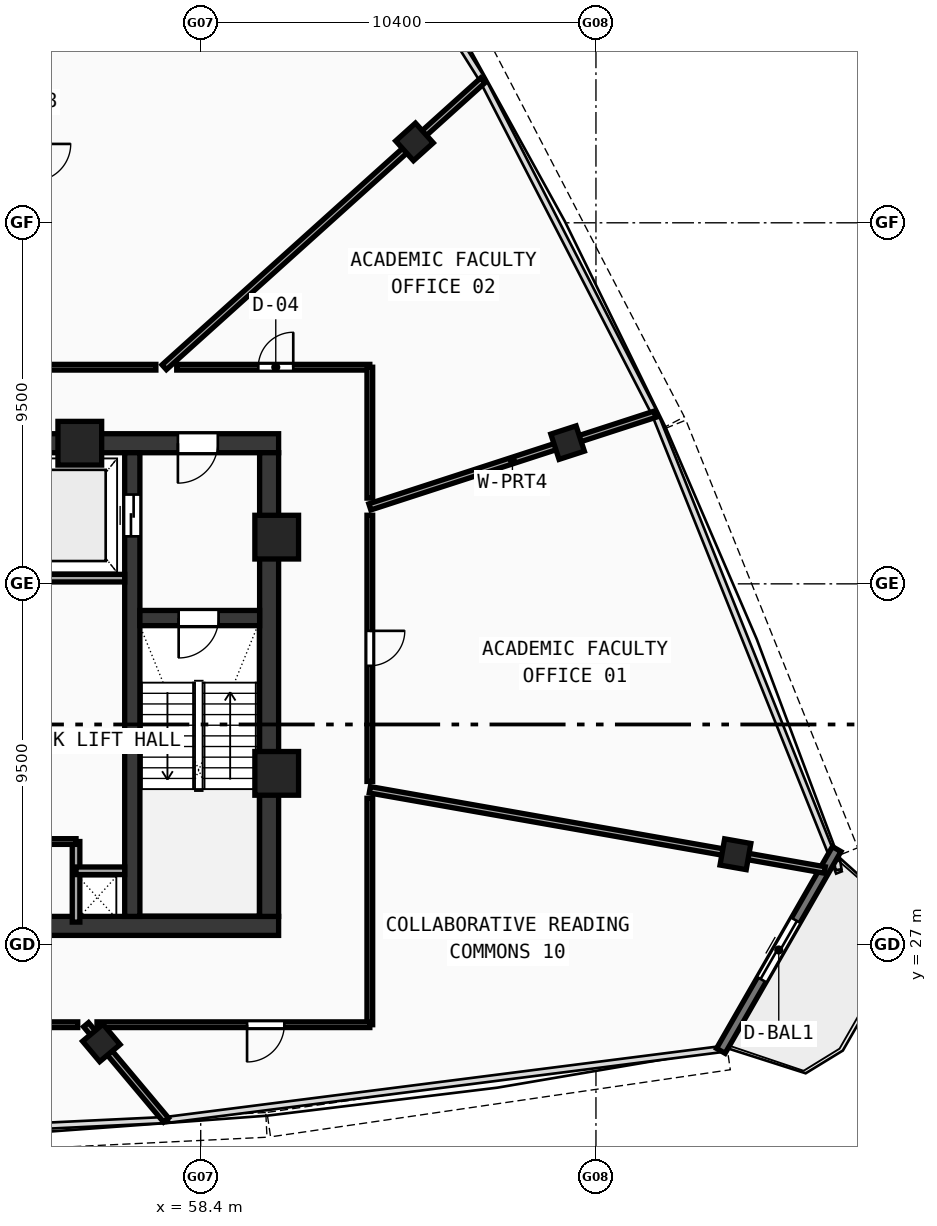
"""IFC4 building model, lengths in metres.
Left out: names, types, materials, properties, quantities, classifications, styles, units other than length and angle.
Written with IfcOpenShell. Run it as: python <this file> out.ifc"""

import sys

from ifc_helpers import new_model, si_unit, direction, frame, frame_2d, origin, origin_with_axes, origin_2d, place, context, subcontext, project, spatial, rectangle, hollow_rectangle, extrude, source, transform, mapped, element, fill, save


model = new_model("IFC4")
c1 = context("Model", 3, precision=1e-05, world=origin(), true_north=direction((0.0, 1.0)))
c2 = subcontext(c1, "Body", "Model", "MODEL_VIEW")
j1 = project(units=[si_unit("LENGTHUNIT", "METRE"), si_unit("PLANEANGLEUNIT", "RADIAN")], contexts=[c1])
p1 = place(None, origin())
s1 = spatial("IfcSite", under=j1, at=p1, CompositionType="ELEMENT")
p2 = place(p1, origin())
s2 = spatial("IfcBuilding", under=s1, at=p2, CompositionType="ELEMENT")
p3 = place(p2, frame((0.0, 0.0, 348.01)))
s3 = spatial("IfcBuildingStorey", under=s2, at=p3, CompositionType="ELEMENT", Elevation=348.01)
p4 = place(p3, frame((35.55, 27.5, 0.0), z_axis=(0.0, 0.0, 1.0), x_axis=(1.0, 0.0, 0.0)))
e1 = element("IfcWall", 1, at=p4, inside=s3, PredefinedType="SHEAR", context=c2, shape_type="SweptSolid", body=[
    extrude(rectangle(XDim=24.9, YDim=0.5, at=frame_2d((12.45, 0.0))), origin(), (0.0, 0.0, 1.0), 3.49),
])
p5 = place(p3, frame((49.2, 40.2, 0.0), z_axis=(0.0, 0.0, 1.0), x_axis=(1.0, 0.0, 0.0)))
e2 = element("IfcWall", 2, at=p5, inside=s3, PredefinedType="SHEAR", context=c2, shape_type="SweptSolid", body=[
    extrude(rectangle(XDim=11.25, YDim=0.5, at=frame_2d((5.625, 0.0))), origin(), (0.0, 0.0, 1.0), 3.49),
])
p6 = place(p5, frame((8.6, 0.0, 0.0)))
e3 = element("IfcOpeningElement", 3, at=p6, cuts=e2, PredefinedType="OPENING", context=c2, shape_type="SweptSolid", body=[
    extrude(rectangle(XDim=1.05, YDim=2.1, at=frame_2d((0.525, 1.05))), frame((0.0, 0.26, 0.0), z_axis=(0.0, -1.0, 0.0), x_axis=(1.0, 0.0, 0.0)), (0.0, 0.0, 1.0), 0.52),
])
p7 = place(p3, frame((60.2, 27.75, 0.0), z_axis=(0.0, 0.0, 1.0), x_axis=(0.0, 1.0, 0.0)))
e4 = element("IfcWall", 4, at=p7, inside=s3, PredefinedType="SHEAR", context=c2, shape_type="SweptSolid", body=[
    extrude(rectangle(XDim=12.2, YDim=0.5, at=frame_2d((6.1, 0.0))), origin(), (0.0, 0.0, 1.0), 3.49),
])
p8 = place(p3, frame((56.6, 27.75, 0.0), z_axis=(0.0, 0.0, 1.0), x_axis=(0.0, 1.0, 0.0)))
e5 = element("IfcWall", 5, at=p8, inside=s3, PredefinedType="SHEAR", context=c2, shape_type="SweptSolid", body=[
    extrude(rectangle(XDim=12.2, YDim=0.4, at=frame_2d((6.1, 0.0))), origin(), (0.0, 0.0, 1.0), 3.49),
])
p9 = place(p8, frame((10.0, 0.0, 0.0)))
e6 = element("IfcOpeningElement", 6, at=p9, cuts=e5, PredefinedType="OPENING", context=c2, shape_type="SweptSolid", body=[
    extrude(rectangle(XDim=1.1, YDim=2.1, at=frame_2d((0.55, 1.05))), frame((0.0, 0.21, 0.0), z_axis=(0.0, -1.0, 0.0), x_axis=(1.0, 0.0, 0.0)), (0.0, 0.0, 1.0), 0.42),
])
p10 = place(p3, frame((56.8, 35.6, 0.0), z_axis=(0.0, 0.0, 1.0), x_axis=(1.0, 0.0, 0.0)))
e7 = element("IfcWall", 7, at=p10, inside=s3, PredefinedType="SHEAR", context=c2, shape_type="SweptSolid", body=[
    extrude(rectangle(XDim=3.15, YDim=0.4, at=frame_2d((1.575, 0.0))), origin(), (0.0, 0.0, 1.0), 3.49),
])
p11 = place(p10, frame((1.02, 0.0, 0.0)))
e8 = element("IfcOpeningElement", 8, at=p11, cuts=e7, PredefinedType="OPENING", context=c2, shape_type="SweptSolid", body=[
    extrude(rectangle(XDim=1.05, YDim=2.1, at=frame_2d((0.525, 1.05))), frame((0.0, 0.21, 0.0), z_axis=(0.0, -1.0, 0.0), x_axis=(1.0, 0.0, 0.0)), (0.0, 0.0, 1.0), 0.42),
])
m1 = source(origin(), c2, "Body", "SweptSolid", [
    extrude(hollow_rectangle(XDim=1.15, YDim=1.15, WallThickness=0.048, at=origin_2d()), origin(), (0.0, 0.0, 1.0), 3.75),
])
for number, where, z_axis, x_axis in (
    (9, (60.4, 31.513, -0.26), (0.0, 0.0, 1.0), (1.0, 0.0, 0.0)),
    (10, (60.4, 37.729, -0.26), (0.0, 0.0, 1.0), (1.0, 0.0, 0.0)),
    (11, (55.219, 40.2, -0.26), (0.0, 0.0, 1.0), (1.0, 0.0, 0.0)),
):
    element("IfcColumn", number, at=place(p3, frame(where, z_axis=z_axis, x_axis=x_axis)), inside=s3, PredefinedType="COLUMN", context=c2, shape_type="MappedRepresentation", body=[
        mapped(m1, transform((0.0, 0.0, 0.0), scale=1.0)),
    ])
m2 = source(origin(), c2, "Body", "SweptSolid", [
    extrude(hollow_rectangle(XDim=0.7, YDim=0.7, WallThickness=0.026, at=origin_2d()), origin(), (0.0, 0.0, 1.0), 3.75),
])
for number, where, z_axis, x_axis in (
    (12, (55.785, 24.422, -0.26), (0.0, 0.0, 1.0), (0.766, 0.643, 0.0)),
    (13, (72.47, 29.385, -0.26), (0.0, 0.0, 1.0), (0.174, 0.985, 0.0)),
    (14, (68.053, 40.216, -0.26), (0.0, 0.0, 1.0), (-0.309, 0.951, 0.0)),
    (15, (64.025, 48.129, -0.26), (0.0, 0.0, 1.0), (-0.669, 0.743, 0.0)),
):
    element("IfcColumn", number, at=place(p3, frame(where, z_axis=z_axis, x_axis=x_axis)), inside=s3, PredefinedType="COLUMN", context=c2, shape_type="MappedRepresentation", body=[
        mapped(m2, transform((0.0, 0.0, 0.0), scale=1.0)),
    ])
p12 = place(p3, frame((72.086, 24.212, 0.0), z_axis=(0.0, 0.0, 1.0), x_axis=(0.49795859982, 0.867200803082, 0.0)))
e16 = element("IfcWall", 16, at=p12, inside=s3, PredefinedType="STANDARD", context=c2, shape_type="SweptSolid", body=[
    extrude(rectangle(XDim=6.123, YDim=0.26, at=frame_2d((3.061, 0.0))), origin(), (0.0, 0.0, 1.0), 3.49),
])
p13 = place(p12, frame((2.161, 0.0, 0.0)))
e17 = element("IfcOpeningElement", 17, at=p13, cuts=e16, PredefinedType="OPENING", context=c2, shape_type="SweptSolid", body=[
    extrude(rectangle(XDim=1.8, YDim=2.15, at=frame_2d((0.9, 1.075))), frame((0.0, 0.14, 0.0), z_axis=(0.0, -1.0, 0.0), x_axis=(1.0, 0.0, 0.0)), (0.0, 0.0, 1.0), 0.28),
])
p14 = place(p3, frame((53.68, 36.65, 0.0), z_axis=(0.0, 0.0, 1.0), x_axis=(1.0, 0.0, 0.0)))
e18 = element("IfcWall", 18, at=p14, inside=s3, PredefinedType="SOLIDWALL", context=c2, shape_type="SweptSolid", body=[
    extrude(rectangle(XDim=2.72, YDim=0.2, at=frame_2d((1.36, 0.0))), origin(), (0.0, 0.0, 1.0), 3.49),
])
p15 = place(p3, frame((55.12, 27.6, 0.0), z_axis=(0.0, 0.0, 1.0), x_axis=(0.0, 1.0, 0.0)))
e19 = element("IfcWall", 19, at=p15, inside=s3, PredefinedType="SOLIDWALL", context=c2, shape_type="SweptSolid", body=[
    extrude(rectangle(XDim=2.12, YDim=0.2, at=frame_2d((1.06, 0.0))), origin(), (0.0, 0.0, 1.0), 3.49),
])
p16 = place(p3, frame((55.12, 28.95, 0.0), z_axis=(0.0, 0.0, 1.0), x_axis=(1.0, 0.0, 0.0)))
e20 = element("IfcWall", 20, at=p16, inside=s3, PredefinedType="SOLIDWALL", context=c2, shape_type="SweptSolid", body=[
    extrude(rectangle(XDim=1.28, YDim=0.2, at=frame_2d((0.64, 0.0))), origin(), (0.0, 0.0, 1.0), 3.49),
])
p17 = place(p3, frame((51.05, 29.72, 0.0), z_axis=(0.0, 0.0, 1.0), x_axis=(1.0, 0.0, 0.0)))
e21 = element("IfcWall", 21, at=p17, inside=s3, PredefinedType="PARTITIONING", context=c2, shape_type="SweptSolid", body=[
    extrude(rectangle(XDim=4.07, YDim=0.15, at=frame_2d((2.035, 0.0))), origin(), (0.0, 0.0, 1.0), 3.49),
])
p18 = place(p17, frame((0.5, 0.0, 0.0)))
e22 = element("IfcOpeningElement", 22, at=p18, cuts=e21, PredefinedType="OPENING", context=c2, shape_type="SweptSolid", body=[
    extrude(rectangle(XDim=0.9, YDim=2.1, at=frame_2d((0.45, 1.05))), frame((0.0, 0.085, 0.0), z_axis=(0.0, -1.0, 0.0), x_axis=(1.0, 0.0, 0.0)), (0.0, 0.0, 1.0), 0.17),
])
p19 = place(p3, frame((62.85, 38.525, 0.0), z_axis=(0.0, 0.0, 1.0), x_axis=(0.951060216318, 0.309005606642, 0.0)))
e23 = element("IfcWall", 23, at=p19, inside=s3, PredefinedType="PARTITIONING", context=c2, shape_type="SweptSolid", body=[
    extrude(rectangle(XDim=7.89, YDim=0.17, at=frame_2d((3.945, 0.0))), origin(), (0.0, 0.0, 1.0), 2.89),
])
p20 = place(p3, frame((57.44, 42.2, 0.0), z_axis=(0.0, 0.0, 1.0), x_axis=(0.74314133574, 0.669134482085, 0.0)))
e24 = element("IfcWall", 24, at=p20, inside=s3, PredefinedType="PARTITIONING", context=c2, shape_type="SweptSolid", body=[
    extrude(rectangle(XDim=11.282, YDim=0.17, at=frame_2d((5.641, 0.0))), origin(), (0.0, 0.0, 1.0), 2.89),
])
p21 = place(p3, frame((55.384, 24.9, 0.0), z_axis=(0.0, 0.0, 1.0), x_axis=(0.642829818613, -0.766009023642, 0.0)))
e25 = element("IfcWall", 25, at=p21, inside=s3, PredefinedType="PARTITIONING", context=c2, shape_type="SweptSolid", body=[
    extrude(rectangle(XDim=3.272, YDim=0.17, at=frame_2d((1.636, 0.0))), origin(), (0.0, 0.0, 1.0), 2.89),
])
p22 = place(p3, frame((62.85, 31.082, 0.0), z_axis=(0.0, 0.0, 1.0), x_axis=(0.984808019511, -0.173646666272, 0.0)))
e26 = element("IfcWall", 26, at=p22, inside=s3, PredefinedType="PARTITIONING", context=c2, shape_type="SweptSolid", body=[
    extrude(rectangle(XDim=12.153, YDim=0.17, at=frame_2d((6.077, 0.0))), origin(), (0.0, 0.0, 1.0), 2.89),
])
p23 = place(p3, frame((54.0, 42.2, 0.0), z_axis=(0.0, 0.0, 1.0), x_axis=(1.0, 0.0, 0.0)))
e27 = element("IfcWall", 27, at=p23, inside=s3, PredefinedType="PARTITIONING", context=c2, shape_type="SweptSolid", body=[
    extrude(rectangle(XDim=3.22, YDim=0.15, at=frame_2d((1.61, 0.0))), origin(), (0.0, 0.0, 1.0), 2.89),
])
p24 = place(p3, frame((57.769, 42.2, 0.0), z_axis=(0.0, 0.0, 1.0), x_axis=(1.0, 0.0, 0.0)))
e28 = element("IfcWall", 28, at=p24, inside=s3, PredefinedType="PARTITIONING", context=c2, shape_type="SweptSolid", body=[
    extrude(rectangle(XDim=5.081, YDim=0.15, at=frame_2d((2.541, 0.0))), origin(), (0.0, 0.0, 1.0), 3.14),
])
p25 = place(p24, frame((2.146, 0.0, 0.0)))
e29 = element("IfcOpeningElement", 29, at=p25, cuts=e28, PredefinedType="OPENING", context=c2, shape_type="SweptSolid", body=[
    extrude(rectangle(XDim=0.92, YDim=2.1, at=frame_2d((0.46, 1.05))), frame((0.0, 0.085, 0.0), z_axis=(0.0, -1.0, 0.0), x_axis=(1.0, 0.0, 0.0)), (0.0, 0.0, 1.0), 0.17),
])
p26 = place(p3, frame((62.85, 42.2, 0.0), z_axis=(0.0, 0.0, 1.0), x_axis=(0.0, -1.0, 0.0)))
e30 = element("IfcWall", 30, at=p26, inside=s3, PredefinedType="PARTITIONING", context=c2, shape_type="SweptSolid", body=[
    extrude(rectangle(XDim=3.444, YDim=0.15, at=frame_2d((1.722, 0.0))), origin(), (0.0, 0.0, 1.0), 3.14),
])
p27 = place(p3, frame((62.85, 38.305, 0.0), z_axis=(0.0, 0.0, 1.0), x_axis=(0.0, -1.0, 0.0)))
e31 = element("IfcWall", 31, at=p27, inside=s3, PredefinedType="PARTITIONING", context=c2, shape_type="SweptSolid", body=[
    extrude(rectangle(XDim=7.004, YDim=0.15, at=frame_2d((3.502, 0.0))), origin(), (0.0, 0.0, 1.0), 3.49),
])
p28 = place(p27, frame((3.042, 0.0, 0.0)))
e32 = element("IfcOpeningElement", 32, at=p28, cuts=e31, PredefinedType="OPENING", context=c2, shape_type="SweptSolid", body=[
    extrude(rectangle(XDim=0.92, YDim=2.1, at=frame_2d((0.46, 1.05))), frame((0.0, 0.085, 0.0), z_axis=(0.0, -1.0, 0.0), x_axis=(1.0, 0.0, 0.0)), (0.0, 0.0, 1.0), 0.17),
])
p29 = place(p3, frame((62.85, 30.858, 0.0), z_axis=(0.0, 0.0, 1.0), x_axis=(0.0, -1.0, 0.0)))
e33 = element("IfcWall", 33, at=p29, inside=s3, PredefinedType="PARTITIONING", context=c2, shape_type="SweptSolid", body=[
    extrude(rectangle(XDim=5.958, YDim=0.15, at=frame_2d((2.979, 0.0))), origin(), (0.0, 0.0, 1.0), 2.89),
])
p30 = place(p3, frame((62.85, 24.9, 0.0), z_axis=(0.0, 0.0, 1.0), x_axis=(-1.0, 0.0, 0.0)))
e34 = element("IfcWall", 34, at=p30, inside=s3, PredefinedType="PARTITIONING", context=c2, shape_type="SweptSolid", body=[
    extrude(rectangle(XDim=7.179, YDim=0.15, at=frame_2d((3.589, 0.0))), origin(), (0.0, 0.0, 1.0), 2.89),
])
p31 = place(p30, frame((2.25, 0.0, 0.0)))
e35 = element("IfcOpeningElement", 35, at=p31, cuts=e34, PredefinedType="OPENING", context=c2, shape_type="SweptSolid", body=[
    extrude(rectangle(XDim=0.98, YDim=2.12, at=frame_2d((0.49, 1.06))), frame((0.0, 0.085, 0.0), z_axis=(0.0, -1.0, 0.0), x_axis=(1.0, 0.0, 0.0)), (0.0, 0.0, 1.0), 0.17),
])
p32 = place(p3, frame((55.164, 24.9, 0.0), z_axis=(0.0, 0.0, 1.0), x_axis=(-1.0, 0.0, 0.0)))
e36 = element("IfcWall", 36, at=p32, inside=s3, PredefinedType="PARTITIONING", context=c2, shape_type="SweptSolid", body=[
    extrude(rectangle(XDim=9.302, YDim=0.15, at=frame_2d((4.651, 0.0))), origin(), (0.0, 0.0, 1.0), 2.89),
])
p33 = place(p32, frame((1.55, 0.0, 0.0)))
e37 = element("IfcOpeningElement", 37, at=p33, cuts=e36, PredefinedType="OPENING", context=c2, shape_type="SweptSolid", body=[
    extrude(rectangle(XDim=0.98, YDim=2.12, at=frame_2d((0.49, 1.06))), frame((0.0, 0.085, 0.0), z_axis=(0.0, -1.0, 0.0), x_axis=(1.0, 0.0, 0.0)), (0.0, 0.0, 1.0), 0.17),
])
m3 = source(origin(), c2, "Body", "SweptSolid", [
    extrude(rectangle(XDim=1.8, YDim=2.15, at=frame_2d((0.9, 1.075))), frame((0.0, 0.025, 0.0), z_axis=(0.0, -1.0, 0.0), x_axis=(1.0, 0.0, 0.0)), (0.0, 0.0, 1.0), 0.05),
])
p34 = place(p13, origin_with_axes())
e38 = element("IfcDoor", 38, at=p34, inside=s3, OperationType="DOUBLE_DOOR_SLIDING", PredefinedType="DOOR", context=c2, shape_type="MappedRepresentation", body=[
    mapped(m3, transform((0.0, 0.0, 0.0), scale=1.0)),
])
fill(e17, e38)
m4 = source(origin(), c2, "Body", "SweptSolid", [
    extrude(rectangle(XDim=1.05, YDim=2.1, at=frame_2d((0.525, 1.05))), frame((0.0, 0.025, 0.0), z_axis=(0.0, -1.0, 0.0), x_axis=(1.0, 0.0, 0.0)), (0.0, 0.0, 1.0), 0.05),
])
p35 = place(p11, frame((1.05, 0.0, 0.0), z_axis=(0.0, 0.0, 1.0), x_axis=(-1.0, 0.0, 0.0)))
e39 = element("IfcDoor", 39, at=p35, inside=s3, OperationType="SINGLE_SWING_RIGHT", PredefinedType="DOOR", context=c2, shape_type="MappedRepresentation", body=[
    mapped(m4, transform((0.0, 0.0, 0.0), scale=1.0)),
])
fill(e8, e39)
p36 = place(p6, frame((1.05, 0.0, 0.0), z_axis=(0.0, 0.0, 1.0), x_axis=(-1.0, 0.0, 0.0)))
e40 = element("IfcDoor", 40, at=p36, inside=s3, OperationType="SINGLE_SWING_RIGHT", PredefinedType="DOOR", context=c2, shape_type="MappedRepresentation", body=[
    mapped(m4, transform((0.0, 0.0, 0.0), scale=1.0)),
])
fill(e3, e40)
m5 = source(origin(), c2, "Body", "SweptSolid", [
    extrude(rectangle(XDim=1.1, YDim=2.1, at=frame_2d((0.55, 1.05))), frame((0.0, 0.025, 0.0), z_axis=(0.0, -1.0, 0.0), x_axis=(1.0, 0.0, 0.0)), (0.0, 0.0, 1.0), 0.05),
])
p37 = place(p9, origin_with_axes())
e41 = element("IfcDoor", 41, at=p37, inside=s3, OperationType="DOUBLE_DOOR_SLIDING", PredefinedType="DOOR", context=c2, shape_type="MappedRepresentation", body=[
    mapped(m5, transform((0.0, 0.0, 0.0), scale=1.0)),
])
fill(e6, e41)
m6 = source(origin(), c2, "Body", "SweptSolid", [
    extrude(rectangle(XDim=0.92, YDim=2.1, at=frame_2d((0.46, 1.05))), frame((0.0, 0.025, 0.0), z_axis=(0.0, -1.0, 0.0), x_axis=(1.0, 0.0, 0.0)), (0.0, 0.0, 1.0), 0.05),
])
p38 = place(p28, origin_with_axes())
e42 = element("IfcDoor", 42, at=p38, inside=s3, OperationType="SINGLE_SWING_LEFT", PredefinedType="DOOR", context=c2, shape_type="MappedRepresentation", body=[
    mapped(m6, transform((0.0, 0.0, 0.0), scale=1.0)),
])
fill(e32, e42)
p39 = place(p25, origin_with_axes())
e43 = element("IfcDoor", 43, at=p39, inside=s3, OperationType="SINGLE_SWING_RIGHT", PredefinedType="DOOR", context=c2, shape_type="MappedRepresentation", body=[
    mapped(m6, transform((0.0, 0.0, 0.0), scale=1.0)),
])
fill(e29, e43)
m7 = source(origin(), c2, "Body", "SweptSolid", [
    extrude(rectangle(XDim=0.98, YDim=2.12, at=frame_2d((0.49, 1.06))), frame((0.0, 0.025, 0.0), z_axis=(0.0, -1.0, 0.0), x_axis=(1.0, 0.0, 0.0)), (0.0, 0.0, 1.0), 0.05),
])
p40 = place(p31, origin_with_axes())
e44 = element("IfcDoor", 44, at=p40, inside=s3, OperationType="SINGLE_SWING_RIGHT", PredefinedType="DOOR", context=c2, shape_type="MappedRepresentation", body=[
    mapped(m7, transform((0.0, 0.0, 0.0), scale=1.0)),
])
fill(e35, e44)
save(model, sys.argv[1])
